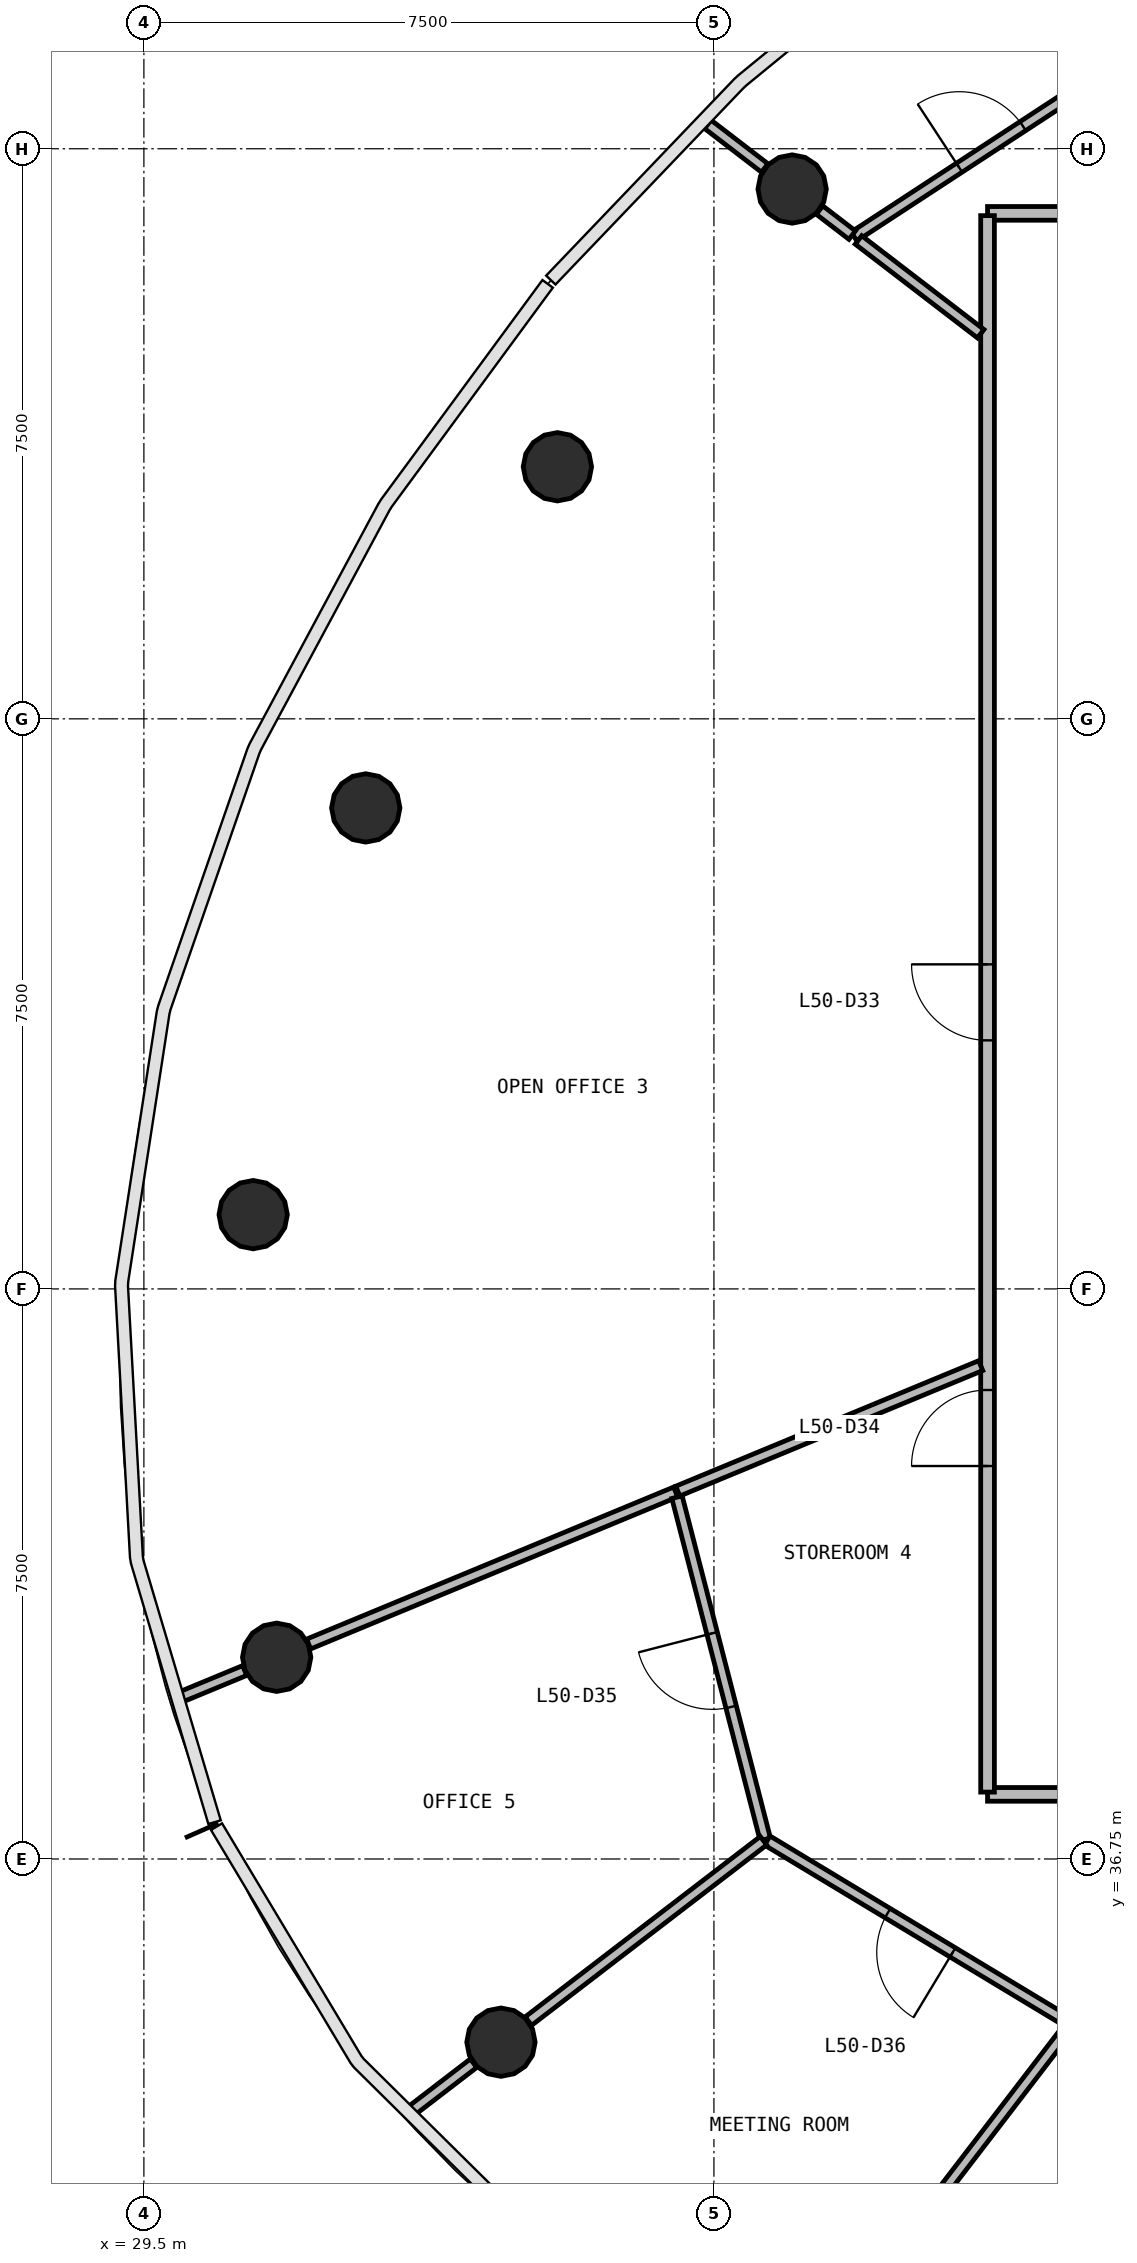
"""IFC4 building model, lengths in metres.
Left out: names, types, materials, properties, quantities, classifications, styles, units other than length and angle.
Written with IfcOpenShell. Run it as: python <this file> out.ifc"""

import sys

from ifc_helpers import new_model, si_unit, direction, frame, frame_2d, origin, origin_2d, place, context, subcontext, project, spatial, rectangle, circle, extrude, source, transform, mapped, element, fill, save


model = new_model("IFC4")
c1 = context("Model", 3, precision=1e-05, world=origin(), true_north=direction((0.0, 1.0)))
c2 = subcontext(c1, "Body", "Model", "MODEL_VIEW")
j1 = project(units=[si_unit("LENGTHUNIT", "METRE"), si_unit("PLANEANGLEUNIT", "RADIAN")], contexts=[c1])
p1 = place(None, origin())
s1 = spatial("IfcSite", under=j1, at=p1, CompositionType="ELEMENT")
p2 = place(p1, origin())
s2 = spatial("IfcBuilding", under=s1, at=p2, CompositionType="ELEMENT")
p3 = place(p2, frame((0.0, 0.0, 207.2)))
s3 = spatial("IfcBuildingStorey", under=s2, at=p3, CompositionType="ELEMENT", Elevation=207.2)
m1 = source(origin(), c2, "Body", "SweptSolid", [
    extrude(circle(Radius=0.45, at=origin_2d()), origin(), (0.0, 0.0, 1.0), 3.9),
])
for number, where, z_axis, x_axis in (
    (1, (38.029, 58.72, 0.0), (0.0, 0.0, 1.0), (1.0, 0.0, 0.0)),
    (2, (34.941, 55.066, 0.0), (0.0, 0.0, 1.0), (1.0, 0.0, 0.0)),
    (3, (32.419, 50.578, 0.0), (0.0, 0.0, 1.0), (1.0, 0.0, 0.0)),
    (4, (30.938, 45.227, 0.0), (0.0, 0.0, 1.0), (1.0, 0.0, 0.0)),
    (5, (31.247, 39.404, 0.0), (0.0, 0.0, 1.0), (1.0, 0.0, 0.0)),
    (6, (34.198, 34.34, 0.0), (0.0, 0.0, 1.0), (1.0, 0.0, 0.0)),
):
    element("IfcColumn", number, at=place(p3, frame(where, z_axis=z_axis, x_axis=x_axis)), inside=s3, PredefinedType="COLUMN", context=c2, shape_type="MappedRepresentation", body=[
        mapped(m1, transform((0.0, 0.0, 0.0), scale=1.0)),
    ])
p4 = place(p3, frame((40.6, 58.4, 0.0), z_axis=(0.0, 0.0, 1.0), x_axis=(1.0, 0.0, 0.0)))
e7 = element("IfcWall", 7, at=p4, inside=s3, PredefinedType="PARTITIONING", context=c2, shape_type="SweptSolid", body=[
    extrude(rectangle(XDim=22.8, YDim=0.18, at=frame_2d((11.4, 0.0))), origin(), (0.0, 0.0, 1.0), 2.88),
])
p5 = place(p4, frame((12.95, 0.0, 0.0)))
e8 = element("IfcOpeningElement", 8, at=p5, cuts=e7, PredefinedType="OPENING", context=c2, shape_type="SweptSolid", body=[
    extrude(rectangle(XDim=1.0, YDim=2.1, at=frame_2d((0.5, 1.05))), frame((0.0, 0.1, 0.0), z_axis=(0.0, -1.0, 0.0), x_axis=(1.0, 0.0, 0.0)), (0.0, 0.0, 1.0), 0.2),
])
p6 = place(p4, frame((10.95, 0.0, 0.0)))
e9 = element("IfcOpeningElement", 9, at=p6, cuts=e7, PredefinedType="OPENING", context=c2, shape_type="SweptSolid", body=[
    extrude(rectangle(XDim=1.0, YDim=2.1, at=frame_2d((0.5, 1.05))), frame((0.0, 0.1, 0.0), z_axis=(0.0, -1.0, 0.0), x_axis=(1.0, 0.0, 0.0)), (0.0, 0.0, 1.0), 0.2),
])
p7 = place(p3, frame((63.4, 37.6, 0.0), z_axis=(0.0, 0.0, 1.0), x_axis=(-1.0, 0.0, 0.0)))
e10 = element("IfcWall", 10, at=p7, inside=s3, PredefinedType="PARTITIONING", context=c2, shape_type="SweptSolid", body=[
    extrude(rectangle(XDim=22.8, YDim=0.18, at=frame_2d((11.4, 0.0))), origin(), (0.0, 0.0, 1.0), 2.88),
])
p8 = place(p7, frame((12.95, 0.0, 0.0)))
e11 = element("IfcOpeningElement", 11, at=p8, cuts=e10, PredefinedType="OPENING", context=c2, shape_type="SweptSolid", body=[
    extrude(rectangle(XDim=1.0, YDim=2.1, at=frame_2d((0.5, 1.05))), frame((0.0, 0.1, 0.0), z_axis=(0.0, -1.0, 0.0), x_axis=(1.0, 0.0, 0.0)), (0.0, 0.0, 1.0), 0.2),
])
p9 = place(p7, frame((10.95, 0.0, 0.0)))
e12 = element("IfcOpeningElement", 12, at=p9, cuts=e10, PredefinedType="OPENING", context=c2, shape_type="SweptSolid", body=[
    extrude(rectangle(XDim=1.0, YDim=2.1, at=frame_2d((0.5, 1.05))), frame((0.0, 0.1, 0.0), z_axis=(0.0, -1.0, 0.0), x_axis=(1.0, 0.0, 0.0)), (0.0, 0.0, 1.0), 0.2),
])
p10 = place(p7, frame((5.75, 0.0, 0.0)))
e13 = element("IfcOpeningElement", 13, at=p10, cuts=e10, PredefinedType="OPENING", context=c2, shape_type="SweptSolid", body=[
    extrude(rectangle(XDim=1.0, YDim=2.1, at=frame_2d((0.5, 1.05))), frame((0.0, 0.1, 0.0), z_axis=(0.0, -1.0, 0.0), x_axis=(1.0, 0.0, 0.0)), (0.0, 0.0, 1.0), 0.2),
])
p11 = place(p3, frame((40.6, 37.63, 0.0), z_axis=(0.0, 0.0, 1.0), x_axis=(0.0, 1.0, 0.0)))
e14 = element("IfcWall", 14, at=p11, inside=s3, PredefinedType="PARTITIONING", context=c2, shape_type="SweptSolid", body=[
    extrude(rectangle(XDim=20.74, YDim=0.18, at=frame_2d((10.37, 0.0))), origin(), (0.0, 0.0, 1.0), 2.88),
])
p12 = place(p11, frame((9.89, 0.0, 0.0)))
e15 = element("IfcOpeningElement", 15, at=p12, cuts=e14, PredefinedType="OPENING", context=c2, shape_type="SweptSolid", body=[
    extrude(rectangle(XDim=1.0, YDim=2.1, at=frame_2d((0.5, 1.05))), frame((0.0, 0.1, 0.0), z_axis=(0.0, -1.0, 0.0), x_axis=(1.0, 0.0, 0.0)), (0.0, 0.0, 1.0), 0.2),
])
p13 = place(p11, frame((4.29, 0.0, 0.0)))
e16 = element("IfcOpeningElement", 16, at=p13, cuts=e14, PredefinedType="OPENING", context=c2, shape_type="SweptSolid", body=[
    extrude(rectangle(XDim=1.0, YDim=2.1, at=frame_2d((0.5, 1.05))), frame((0.0, 0.1, 0.0), z_axis=(0.0, -1.0, 0.0), x_axis=(1.0, 0.0, 0.0)), (0.0, 0.0, 1.0), 0.2),
])
p14 = place(p3, frame((36.497, 41.578, 0.0), z_axis=(0.0, 0.0, 1.0), x_axis=(-0.923872241602, -0.382701033703, 0.0)))
e17 = element("IfcWall", 17, at=p14, inside=s3, PredefinedType="PARTITIONING", context=c2, shape_type="SweptSolid", body=[
    extrude(rectangle(XDim=5.227, YDim=0.14, at=frame_2d((2.614, 0.0))), origin(), (0.0, 0.0, 1.0), 2.88),
])
p15 = place(p3, frame((37.676, 37.009, 0.0), z_axis=(0.0, 0.0, 1.0), x_axis=(-0.249819251726, 0.968292487561, 0.0)))
e18 = element("IfcWall", 18, at=p15, inside=s3, PredefinedType="PARTITIONING", context=c2, shape_type="SweptSolid", body=[
    extrude(rectangle(XDim=4.649, YDim=0.14, at=frame_2d((2.324, 0.0))), origin(), (0.0, 0.0, 1.0), 2.88),
])
p16 = place(p15, frame((1.799, 0.0, 0.0)))
e19 = element("IfcOpeningElement", 19, at=p16, cuts=e18, PredefinedType="OPENING", context=c2, shape_type="SweptSolid", body=[
    extrude(rectangle(XDim=1.0, YDim=2.1, at=frame_2d((0.5, 1.05))), frame((0.0, 0.08, 0.0), z_axis=(0.0, -1.0, 0.0), x_axis=(1.0, 0.0, 0.0)), (0.0, 0.0, 1.0), 0.16),
])
p17 = place(p3, frame((41.702, 34.58, 0.0), z_axis=(0.0, 0.0, 1.0), x_axis=(-0.856310382511, 0.516461546298, 0.0)))
e20 = element("IfcWall", 20, at=p17, inside=s3, PredefinedType="PARTITIONING", context=c2, shape_type="SweptSolid", body=[
    extrude(rectangle(XDim=4.672, YDim=0.14, at=frame_2d((2.336, 0.0))), origin(), (0.0, 0.0, 1.0), 2.88),
])
p18 = place(p17, frame((1.823, 0.0, 0.0)))
e21 = element("IfcOpeningElement", 21, at=p18, cuts=e20, PredefinedType="OPENING", context=c2, shape_type="SweptSolid", body=[
    extrude(rectangle(XDim=1.0, YDim=2.1, at=frame_2d((0.5, 1.05))), frame((0.0, 0.08, 0.0), z_axis=(0.0, -1.0, 0.0), x_axis=(1.0, 0.0, 0.0)), (0.0, 0.0, 1.0), 0.16),
])
p19 = place(p3, frame((40.51, 43.241, 0.0), z_axis=(0.0, 0.0, 1.0), x_axis=(-0.923880260939, -0.382681673781, 0.0)))
e22 = element("IfcWall", 22, at=p19, inside=s3, PredefinedType="PARTITIONING", context=c2, shape_type="SweptSolid", body=[
    extrude(rectangle(XDim=4.314, YDim=0.14, at=frame_2d((2.157, 0.0))), origin(), (0.0, 0.0, 1.0), 2.88),
])
p20 = place(p3, frame((38.843, 58.096, 0.0), z_axis=(0.0, 0.0, 1.0), x_axis=(0.83707650684, 0.547085844907, 0.0)))
e23 = element("IfcWall", 23, at=p20, inside=s3, PredefinedType="PARTITIONING", context=c2, shape_type="SweptSolid", body=[
    extrude(rectangle(XDim=4.305, YDim=0.14, at=frame_2d((2.152, 0.0))), origin(), (0.0, 0.0, 1.0), 2.88),
])
p21 = place(p20, frame((1.655, 0.0, 0.0)))
e24 = element("IfcOpeningElement", 24, at=p21, cuts=e23, PredefinedType="OPENING", context=c2, shape_type="SweptSolid", body=[
    extrude(rectangle(XDim=1.0, YDim=2.1, at=frame_2d((0.5, 1.05))), frame((0.0, 0.08, 0.0), z_axis=(0.0, -1.0, 0.0), x_axis=(1.0, 0.0, 0.0)), (0.0, 0.0, 1.0), 0.16),
])
p22 = place(p3, frame((37.652, 36.99, 0.0), z_axis=(0.0, 0.0, 1.0), x_axis=(-0.793347300472, -0.608769300173, 0.0)))
e25 = element("IfcWall", 25, at=p22, inside=s3, PredefinedType="PARTITIONING", context=c2, shape_type="SweptSolid", body=[
    extrude(rectangle(XDim=3.899, YDim=0.14, at=frame_2d((1.95, 0.0))), origin(), (0.0, 0.0, 1.0), 2.88),
])
p23 = place(p3, frame((41.66, 34.524, 0.0), z_axis=(0.0, 0.0, 1.0), x_axis=(-0.60877322383, -0.793344289667, 0.0)))
e26 = element("IfcWall", 26, at=p23, inside=s3, PredefinedType="PARTITIONING", context=c2, shape_type="SweptSolid", body=[
    extrude(rectangle(XDim=3.765, YDim=0.14, at=frame_2d((1.882, 0.0))), origin(), (0.0, 0.0, 1.0), 2.88),
])
p24 = place(p3, frame((38.39, 58.444, 0.0), z_axis=(0.0, 0.0, 1.0), x_axis=(0.793294129055, -0.608838586825, 0.0)))
e27 = element("IfcWall", 27, at=p24, inside=s3, PredefinedType="PARTITIONING", context=c2, shape_type="SweptSolid", body=[
    extrude(rectangle(XDim=0.541, YDim=0.14, at=frame_2d((0.271, 0.0))), origin(), (0.0, 0.0, 1.0), 2.88),
])
p25 = place(p3, frame((38.902, 58.051, 0.0), z_axis=(0.0, 0.0, 1.0), x_axis=(0.7933756116, -0.608732403374, 0.0)))
e28 = element("IfcWall", 28, at=p25, inside=s3, PredefinedType="PARTITIONING", context=c2, shape_type="SweptSolid", body=[
    extrude(rectangle(XDim=2.027, YDim=0.14, at=frame_2d((1.013, 0.0))), origin(), (0.0, 0.0, 1.0), 2.88),
])
p26 = place(p3, frame((33.837, 34.063, 0.0), z_axis=(0.0, 0.0, 1.0), x_axis=(-0.793403619358, -0.608695898449, 0.0)))
e29 = element("IfcWall", 29, at=p26, inside=s3, PredefinedType="PARTITIONING", context=c2, shape_type="SweptSolid", body=[
    extrude(rectangle(XDim=1.047, YDim=0.14, at=frame_2d((0.523, 0.0))), origin(), (0.0, 0.0, 1.0), 2.88),
])
p27 = place(p3, frame((30.826, 39.23, 0.0), z_axis=(0.0, 0.0, 1.0), x_axis=(-0.923779659408, -0.38292445843, 0.0)))
e30 = element("IfcWall", 30, at=p27, inside=s3, PredefinedType="PARTITIONING", context=c2, shape_type="SweptSolid", body=[
    extrude(rectangle(XDim=0.954, YDim=0.14, at=frame_2d((0.477, 0.0))), origin(), (0.0, 0.0, 1.0), 2.88),
])
p28 = place(p3, frame((37.668, 58.997, 0.0), z_axis=(0.0, 0.0, 1.0), x_axis=(-0.793344167197, 0.608773383431, 0.0)))
e31 = element("IfcWall", 31, at=p28, inside=s3, PredefinedType="PARTITIONING", context=c2, shape_type="SweptSolid", body=[
    extrude(rectangle(XDim=0.944, YDim=0.14, at=frame_2d((0.472, 0.0))), origin(), (0.0, 0.0, 1.0), 2.88),
])
m2 = source(origin(), c2, "Body", "SweptSolid", [
    extrude(rectangle(XDim=1.0, YDim=2.1, at=frame_2d((0.5, 1.05))), frame((0.0, 0.025, 0.0), z_axis=(0.0, -1.0, 0.0), x_axis=(1.0, 0.0, 0.0)), (0.0, 0.0, 1.0), 0.05),
])
p29 = place(p21, origin())
e32 = element("IfcDoor", 32, at=p29, inside=s3, OperationType="SINGLE_SWING_LEFT", PredefinedType="DOOR", context=c2, shape_type="MappedRepresentation", body=[
    mapped(m2, transform((0.0, 0.0, 0.0), scale=1.0)),
])
fill(e24, e32)
p30 = place(p12, origin())
e33 = element("IfcDoor", 33, at=p30, inside=s3, OperationType="SINGLE_SWING_RIGHT", PredefinedType="DOOR", context=c2, shape_type="MappedRepresentation", body=[
    mapped(m2, transform((0.0, 0.0, 0.0), scale=1.0)),
])
fill(e15, e33)
p31 = place(p13, origin())
e34 = element("IfcDoor", 34, at=p31, inside=s3, OperationType="SINGLE_SWING_LEFT", PredefinedType="DOOR", context=c2, shape_type="MappedRepresentation", body=[
    mapped(m2, transform((0.0, 0.0, 0.0), scale=1.0)),
])
fill(e16, e34)
p32 = place(p16, origin())
e35 = element("IfcDoor", 35, at=p32, inside=s3, OperationType="SINGLE_SWING_RIGHT", PredefinedType="DOOR", context=c2, shape_type="MappedRepresentation", body=[
    mapped(m2, transform((0.0, 0.0, 0.0), scale=1.0)),
])
fill(e19, e35)
p33 = place(p18, origin())
e36 = element("IfcDoor", 36, at=p33, inside=s3, OperationType="SINGLE_SWING_LEFT", PredefinedType="DOOR", context=c2, shape_type="MappedRepresentation", body=[
    mapped(m2, transform((0.0, 0.0, 0.0), scale=1.0)),
])
fill(e21, e36)
save(model, sys.argv[1])
